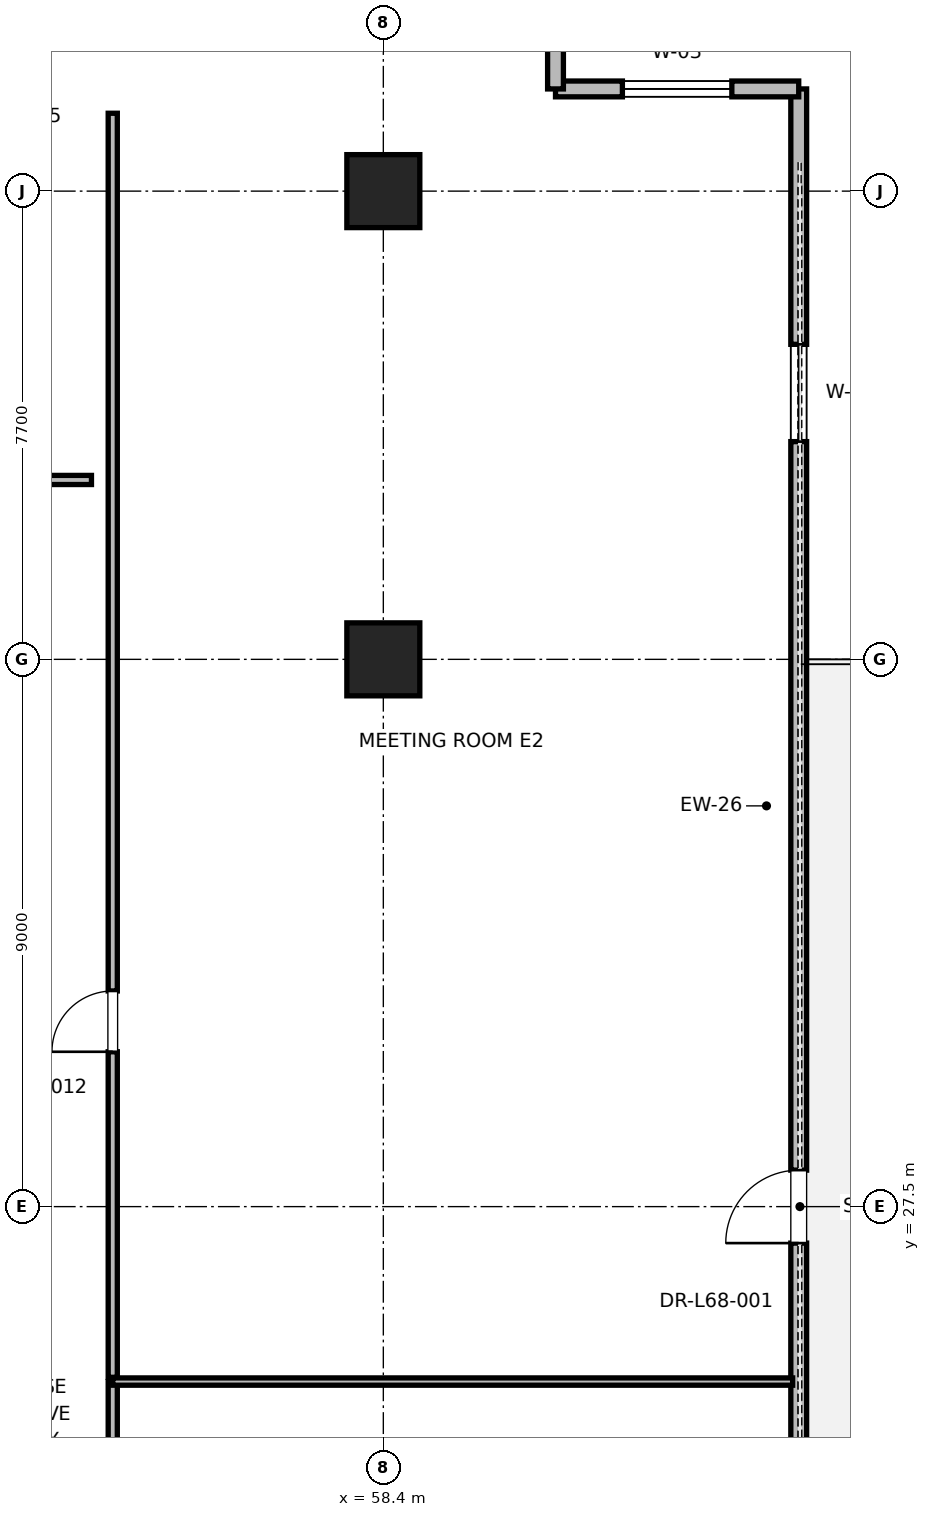
"""IFC4 building model, lengths in metres.
Left out: names, types, materials, properties, quantities, classifications, styles, units other than length and angle.
Written with IfcOpenShell. Run it as: python <this file> out.ifc"""

import sys

from ifc_helpers import new_model, si_unit, direction, frame, frame_2d, origin, origin_2d, place, context, subcontext, project, spatial, rectangle, extrude, element, fill, save


model = new_model("IFC4")
c1 = context("Model", 3, precision=1e-05, world=origin(), true_north=direction((0.0, 1.0)))
c2 = subcontext(c1, "Body", "Model", "MODEL_VIEW")
j1 = project(units=[si_unit("LENGTHUNIT", "METRE"), si_unit("PLANEANGLEUNIT", "RADIAN")], contexts=[c1])
p1 = place(None, origin())
s1 = spatial("IfcSite", under=j1, at=p1, CompositionType="ELEMENT")
p2 = place(p1, origin())
s2 = spatial("IfcBuilding", under=s1, at=p2, CompositionType="ELEMENT")
p3 = place(p2, frame((0.0, 0.0, 291.2)))
s3 = spatial("IfcBuildingStorey", under=s2, at=p3, CompositionType="ELEMENT", Elevation=291.2)
for number, where, z_axis, x_axis in (
    (1, (58.4, 36.5, 0.0), (0.0, 0.0, 1.0), (1.0, 0.0, 0.0)),
    (2, (58.4, 44.2, 0.0), (0.0, 0.0, 1.0), (1.0, 0.0, 0.0)),
):
    element("IfcColumn", number, at=place(p3, frame(where, z_axis=z_axis, x_axis=x_axis)), inside=s3, PredefinedType="COLUMN", context=c2, shape_type="SweptSolid", body=[
        extrude(rectangle(XDim=1.2, YDim=1.2, at=origin_2d()), origin(), (0.0, 0.0, 1.0), 4.0),
    ])
p4 = place(p3, frame((65.232, 9.119, 0.0), z_axis=(0.0, 0.0, 1.0), x_axis=(0.0, 1.0, 0.0)))
e3 = element("IfcWall", 3, at=p4, inside=s3, PredefinedType="PARAPET", context=c2, shape_type="SweptSolid", body=[
    extrude(rectangle(XDim=36.761, YDim=0.26, at=frame_2d((18.381, 0.0))), origin(), (0.0, 0.0, 1.0), 2.753),
])
p5 = place(p4, frame((4.2, 0.0, 0.85)))
e4 = element("IfcOpeningElement", 4, at=p5, cuts=e3, PredefinedType="OPENING", context=c2, shape_type="SweptSolid", body=[
    extrude(rectangle(XDim=1.6, YDim=2.1, at=frame_2d((0.8, 1.05))), frame((0.0, 0.13, 0.0), z_axis=(0.0, -1.0, 0.0), x_axis=(1.0, 0.0, 0.0)), (0.0, 0.0, 1.0), 0.26),
])
p6 = place(p4, frame((17.781, 0.0, 0.0)))
e5 = element("IfcOpeningElement", 5, at=p6, cuts=e3, PredefinedType="OPENING", context=c2, shape_type="SweptSolid", body=[
    extrude(rectangle(XDim=1.2, YDim=2.2, at=frame_2d((0.6, 1.1))), frame((0.0, 0.13, 0.0), z_axis=(0.0, -1.0, 0.0), x_axis=(1.0, 0.0, 0.0)), (0.0, 0.0, 1.0), 0.26),
])
p7 = place(p4, frame((30.961, 0.0, 0.85)))
e6 = element("IfcOpeningElement", 6, at=p7, cuts=e3, PredefinedType="OPENING", context=c2, shape_type="SweptSolid", body=[
    extrude(rectangle(XDim=1.6, YDim=2.1, at=frame_2d((0.8, 1.05))), frame((0.0, 0.13, 0.0), z_axis=(0.0, -1.0, 0.0), x_axis=(1.0, 0.0, 0.0)), (0.0, 0.0, 1.0), 0.26),
])
p8 = place(p3, frame((65.232, 45.881, 0.0), z_axis=(0.0, 0.0, 1.0), x_axis=(-1.0, 0.0, 0.0)))
e7 = element("IfcWall", 7, at=p8, inside=s3, PredefinedType="PARAPET", context=c2, shape_type="SweptSolid", body=[
    extrude(rectangle(XDim=4.0, YDim=0.26, at=frame_2d((2.0, 0.0))), origin(), (0.0, 0.0, 1.0), 3.7),
])
p9 = place(p8, frame((1.1, 0.0, 0.85)))
e8 = element("IfcOpeningElement", 8, at=p9, cuts=e7, PredefinedType="OPENING", context=c2, shape_type="SweptSolid", body=[
    extrude(rectangle(XDim=1.8, YDim=2.2, at=frame_2d((0.9, 1.1))), frame((0.0, 0.13, 0.0), z_axis=(0.0, -1.0, 0.0), x_axis=(1.0, 0.0, 0.0)), (0.0, 0.0, 1.0), 0.26),
])
p10 = place(p3, frame((61.232, 45.881, 0.0), z_axis=(0.0, 0.0, 1.0), x_axis=(0.0, 1.0, 0.0)))
e9 = element("IfcWall", 9, at=p10, inside=s3, PredefinedType="PARAPET", context=c2, shape_type="SweptSolid", body=[
    extrude(rectangle(XDim=3.5, YDim=0.26, at=frame_2d((1.75, 0.0))), origin(), (0.0, 0.0, 1.0), 3.7),
])
p11 = place(p3, frame((49.046, 39.45, 0.0), z_axis=(0.0, 0.0, 1.0), x_axis=(1.0, 0.0, 0.0)))
e10 = element("IfcWall", 10, at=p11, inside=s3, PredefinedType="PARTITIONING", context=c2, shape_type="SweptSolid", body=[
    extrude(rectangle(XDim=4.554, YDim=0.15, at=frame_2d((2.277, 0.0))), origin(), (0.0, 0.0, 1.0), 2.753),
])
p12 = place(p11, frame((1.727, 0.0, 0.0)))
e11 = element("IfcOpeningElement", 11, at=p12, cuts=e10, PredefinedType="OPENING", context=c2, shape_type="SweptSolid", body=[
    extrude(rectangle(XDim=1.0, YDim=2.15, at=frame_2d((0.5, 1.075))), frame((0.0, 0.075, 0.0), z_axis=(0.0, -1.0, 0.0), x_axis=(1.0, 0.0, 0.0)), (0.0, 0.0, 1.0), 0.15),
])
p13 = place(p3, frame((53.95, 9.519, 0.0), z_axis=(0.0, 0.0, 1.0), x_axis=(0.0, 1.0, 0.0)))
e12 = element("IfcWall", 12, at=p13, inside=s3, PredefinedType="PARTITIONING", context=c2, shape_type="SweptSolid", body=[
    extrude(rectangle(XDim=15.104, YDim=0.15, at=frame_2d((7.552, 0.0))), origin(), (0.0, 0.0, 1.0), 2.753),
])
p14 = place(p13, frame((11.307, 0.0, 0.0)))
e13 = element("IfcOpeningElement", 13, at=p14, cuts=e12, PredefinedType="OPENING", context=c2, shape_type="SweptSolid", body=[
    extrude(rectangle(XDim=1.5, YDim=2.25, at=frame_2d((0.75, 1.125))), frame((0.0, 0.075, 0.0), z_axis=(0.0, -1.0, 0.0), x_axis=(1.0, 0.0, 0.0)), (0.0, 0.0, 1.0), 0.15),
])
p15 = place(p3, frame((53.95, 24.623, 0.0), z_axis=(0.0, 0.0, 1.0), x_axis=(1.0, 0.0, 0.0)))
e14 = element("IfcWall", 14, at=p15, inside=s3, PredefinedType="PARTITIONING", context=c2, shape_type="SweptSolid", body=[
    extrude(rectangle(XDim=11.182, YDim=0.12, at=frame_2d((5.591, 0.0))), origin(), (0.0, 0.0, 1.0), 2.753),
])
p16 = place(p3, frame((53.95, 24.693, 0.0), z_axis=(0.0, 0.0, 1.0), x_axis=(0.0, 1.0, 0.0)))
e15 = element("IfcWall", 15, at=p16, inside=s3, PredefinedType="PARTITIONING", context=c2, shape_type="SweptSolid", body=[
    extrude(rectangle(XDim=20.788, YDim=0.15, at=frame_2d((10.394, 0.0))), origin(), (0.0, 0.0, 1.0), 2.753),
])
p17 = place(p16, frame((5.354, 0.0, 0.0)))
e16 = element("IfcOpeningElement", 16, at=p17, cuts=e15, PredefinedType="OPENING", context=c2, shape_type="SweptSolid", body=[
    extrude(rectangle(XDim=1.0, YDim=2.15, at=frame_2d((0.5, 1.075))), frame((0.0, 0.075, 0.0), z_axis=(0.0, -1.0, 0.0), x_axis=(1.0, 0.0, 0.0)), (0.0, 0.0, 1.0), 0.15),
])
p18 = place(p6, origin())
e17 = element("IfcDoor", 17, at=p18, inside=s3, OperationType="SINGLE_SWING_LEFT", PredefinedType="DOOR", context=c2, shape_type="SweptSolid", body=[
    extrude(rectangle(XDim=1.2, YDim=2.2, at=frame_2d((0.6, 1.1))), frame((0.0, 0.025, 0.0), z_axis=(0.0, -1.0, 0.0), x_axis=(1.0, 0.0, 0.0)), (0.0, 0.0, 1.0), 0.05),
])
fill(e5, e17)
p19 = place(p7, origin())
e18 = element("IfcWindow", 18, at=p19, inside=s3, PartitioningType="SINGLE_PANEL", PredefinedType="WINDOW", context=c2, shape_type="SweptSolid", body=[
    extrude(rectangle(XDim=1.6, YDim=2.1, at=frame_2d((0.8, 1.05))), frame((0.0, 0.03, 0.0), z_axis=(0.0, -1.0, 0.0), x_axis=(1.0, 0.0, 0.0)), (0.0, 0.0, 1.0), 0.06),
])
fill(e6, e18)
p20 = place(p9, origin())
e19 = element("IfcWindow", 19, at=p20, inside=s3, PartitioningType="SINGLE_PANEL", PredefinedType="WINDOW", context=c2, shape_type="SweptSolid", body=[
    extrude(rectangle(XDim=1.8, YDim=2.2, at=frame_2d((0.9, 1.1))), frame((0.0, 0.03, 0.0), z_axis=(0.0, -1.0, 0.0), x_axis=(1.0, 0.0, 0.0)), (0.0, 0.0, 1.0), 0.06),
])
fill(e8, e19)
p21 = place(p17, origin())
e20 = element("IfcDoor", 20, at=p21, inside=s3, OperationType="SINGLE_SWING_LEFT", PredefinedType="DOOR", context=c2, shape_type="SweptSolid", body=[
    extrude(rectangle(XDim=1.0, YDim=2.15, at=frame_2d((0.5, 1.075))), frame((0.0, 0.025, 0.0), z_axis=(0.0, -1.0, 0.0), x_axis=(1.0, 0.0, 0.0)), (0.0, 0.0, 1.0), 0.05),
])
fill(e16, e20)
save(model, sys.argv[1])
